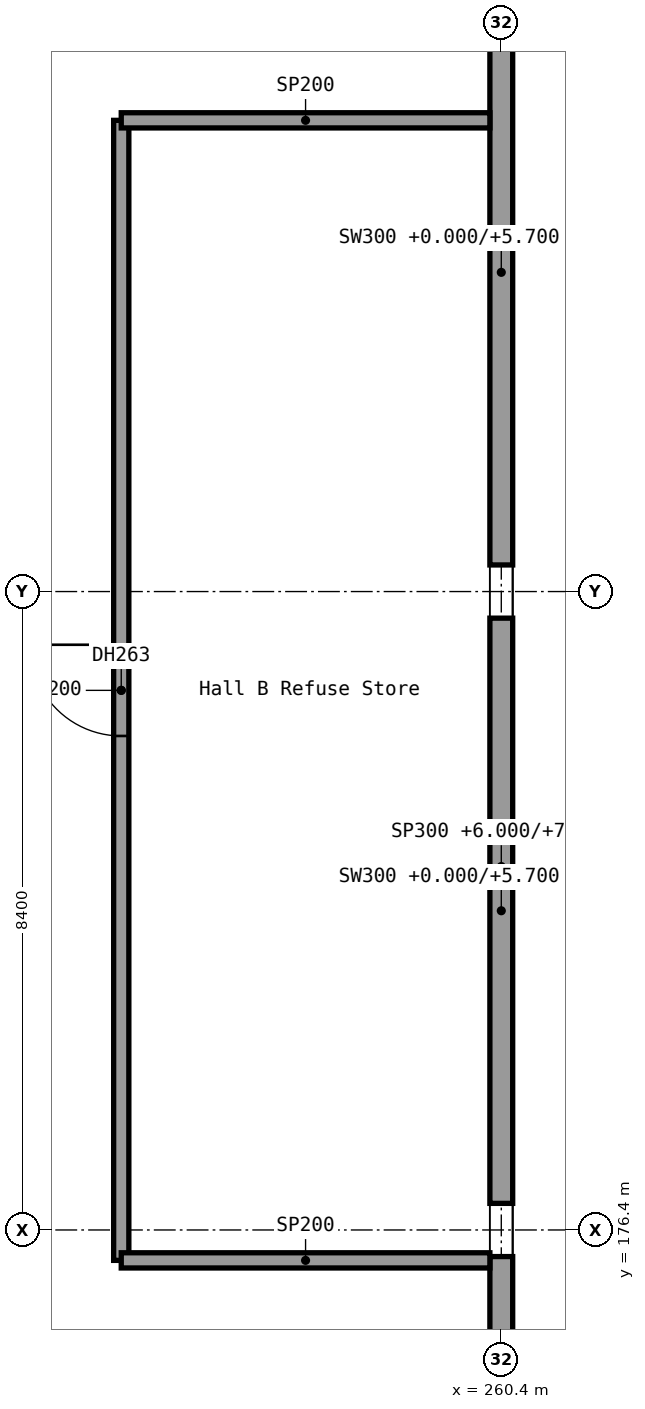
"""IFC4 building model, lengths in metres.
Left out: names, types, materials, properties, quantities, classifications, styles, units other than length and angle.
Written with IfcOpenShell. Run it as: python <this file> out.ifc"""

import sys

from ifc_helpers import new_model, si_unit, direction, frame, frame_2d, origin, origin_2d, place, context, subcontext, project, spatial, rectangle, extrude, element, fill, save


model = new_model("IFC4")
c1 = context("Model", 3, precision=1e-05, world=origin(), true_north=direction((0.0, 1.0)))
c2 = subcontext(c1, "Body", "Model", "MODEL_VIEW")
j1 = project(units=[si_unit("LENGTHUNIT", "METRE"), si_unit("PLANEANGLEUNIT", "RADIAN")], contexts=[c1])
p1 = place(None, origin())
s1 = spatial("IfcSite", under=j1, at=p1, CompositionType="ELEMENT")
p2 = place(p1, origin())
s2 = spatial("IfcBuilding", under=s1, at=p2, CompositionType="ELEMENT")
p3 = place(p2, origin())
s3 = spatial("IfcBuildingStorey", under=s2, at=p3, CompositionType="ELEMENT", Elevation=0.0)
for number, where, z_axis, x_axis in (
    (1, (260.4, 176.4, 0.0), (0.0, 0.0, 1.0), (1.0, 0.0, 0.0)),
    (2, (260.4, 184.8, 0.0), (0.0, 0.0, 1.0), (1.0, 0.0, 0.0)),
):
    element("IfcColumn", number, at=place(p3, frame(where, z_axis=z_axis, x_axis=x_axis)), inside=s3, PredefinedType="COLUMN", context=c2, shape_type="SweptSolid", body=[
        extrude(rectangle(XDim=0.7, YDim=0.7, at=origin_2d()), origin(), (0.0, 0.0, 1.0), 4.8),
    ])
for number, where, z_axis, x_axis in (
    (3, (260.4, 168.35, 0.0), (0.0, 0.0, 1.0), (0.0, 1.0, 0.0)),
    (4, (260.4, 176.75, 0.0), (0.0, 0.0, 1.0), (0.0, 1.0, 0.0)),
):
    element("IfcWall", number, at=place(p3, frame(where, z_axis=z_axis, x_axis=x_axis)), inside=s3, PredefinedType="SOLIDWALL", context=c2, shape_type="SweptSolid", body=[
        extrude(rectangle(XDim=7.7, YDim=0.3, at=frame_2d((3.85, 0.0))), origin(), (0.0, 0.0, 1.0), 5.7),
    ])
p4 = place(p3, frame((260.4, 185.15, 0.0), z_axis=(0.0, 0.0, 1.0), x_axis=(0.0, 1.0, 0.0)))
e5 = element("IfcWall", 5, at=p4, inside=s3, PredefinedType="SOLIDWALL", context=c2, shape_type="SweptSolid", body=[
    extrude(rectangle(XDim=7.7, YDim=0.3, at=frame_2d((3.85, 0.0))), origin(), (0.0, 0.0, 1.0), 5.7),
])
p5 = place(p3, frame((260.4, 100.8, 6.0), z_axis=(0.0, 0.0, 1.0), x_axis=(0.0, 1.0, 0.0)))
e6 = element("IfcWall", 6, at=p5, inside=s3, PredefinedType="PARAPET", context=c2, shape_type="SweptSolid", body=[
    extrude(rectangle(XDim=100.8, YDim=0.3, at=frame_2d((50.4, 0.0))), origin(), (0.0, 0.0, 1.0), 1.2),
])
p6 = place(p3, frame((255.4, 176.0, 0.0), z_axis=(0.0, 0.0, 1.0), x_axis=(0.0, 1.0, 0.0)))
e7 = element("IfcWall", 7, at=p6, inside=s3, PredefinedType="PARTITIONING", context=c2, shape_type="SweptSolid", body=[
    extrude(rectangle(XDim=15.0, YDim=0.2, at=frame_2d((7.5, 0.0))), origin(), (0.0, 0.0, 1.0), 4.8),
])
p7 = place(p6, frame((6.9, 0.0, 0.0)))
e8 = element("IfcOpeningElement", 8, at=p7, cuts=e7, PredefinedType="OPENING", context=c2, shape_type="SweptSolid", body=[
    extrude(rectangle(XDim=1.2, YDim=2.1, at=frame_2d((0.6, 1.05))), frame((0.0, 0.1, 0.0), z_axis=(0.0, -1.0, 0.0), x_axis=(1.0, 0.0, 0.0)), (0.0, 0.0, 1.0), 0.2),
])
for number, where, z_axis, x_axis in (
    (9, (255.4, 176.0, 0.0), (0.0, 0.0, 1.0), (1.0, 0.0, 0.0)),
    (10, (255.4, 191.0, 0.0), (0.0, 0.0, 1.0), (1.0, 0.0, 0.0)),
):
    element("IfcWall", number, at=place(p3, frame(where, z_axis=z_axis, x_axis=x_axis)), inside=s3, PredefinedType="PARTITIONING", context=c2, shape_type="SweptSolid", body=[
        extrude(rectangle(XDim=4.85, YDim=0.2, at=frame_2d((2.425, 0.0))), origin(), (0.0, 0.0, 1.0), 4.8),
    ])
p8 = place(p7, origin())
e11 = element("IfcDoor", 11, at=p8, inside=s3, OperationType="SINGLE_SWING_RIGHT", PredefinedType="DOOR", context=c2, shape_type="SweptSolid", body=[
    extrude(rectangle(XDim=1.2, YDim=2.1, at=frame_2d((0.6, 1.05))), frame((0.0, 0.025, 0.0), z_axis=(0.0, -1.0, 0.0), x_axis=(1.0, 0.0, 0.0)), (0.0, 0.0, 1.0), 0.05),
])
fill(e8, e11)
save(model, sys.argv[1])
